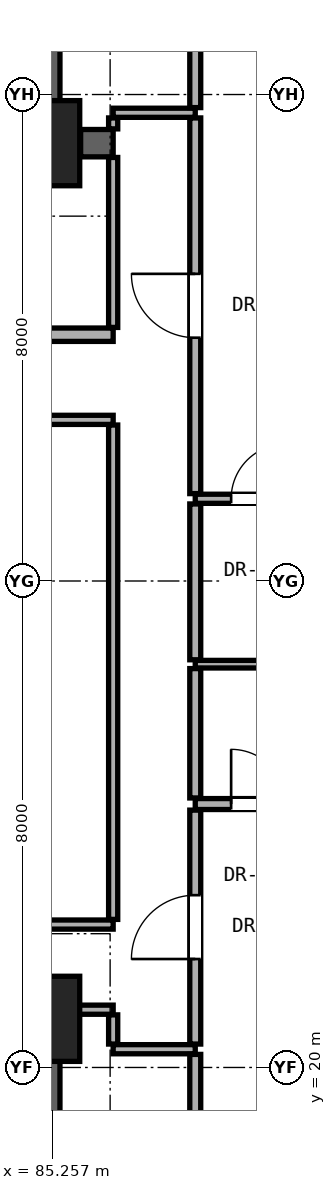
"""IFC4 building model, lengths in metres.
Left out: names, types, materials, properties, quantities, classifications, styles, units other than length and angle.
Written with IfcOpenShell. Run it as: python <this file> out.ifc"""

import sys

from ifc_helpers import new_model, si_unit, direction, frame, frame_2d, origin, origin_2d, place, context, subcontext, project, spatial, rectangle, extrude, element, fill, save


model = new_model("IFC4")
c1 = context("Model", 3, precision=1e-05, world=origin(), true_north=direction((0.0, 1.0)))
c2 = subcontext(c1, "Body", "Model", "MODEL_VIEW")
j1 = project(units=[si_unit("LENGTHUNIT", "METRE"), si_unit("PLANEANGLEUNIT", "RADIAN")], contexts=[c1])
p1 = place(None, origin())
s1 = spatial("IfcSite", under=j1, at=p1, CompositionType="ELEMENT")
p2 = place(p1, origin())
s2 = spatial("IfcBuilding", under=s1, at=p2, CompositionType="ELEMENT")
p3 = place(p2, frame((0.0, 0.0, 29.0)))
s3 = spatial("IfcBuildingStorey", under=s2, at=p3, CompositionType="ELEMENT", Elevation=29.0)
for number, where, z_axis, x_axis in (
    (1, (85.0, 20.8, 0.0), (0.0, 0.0, 1.0), (1.0, 0.0, 0.0)),
    (2, (85.0, 35.2, 0.0), (0.0, 0.0, 1.0), (1.0, 0.0, 0.0)),
):
    element("IfcColumn", number, at=place(p3, frame(where, z_axis=z_axis, x_axis=x_axis)), inside=s3, PredefinedType="COLUMN", context=c2, shape_type="SweptSolid", body=[
        extrude(rectangle(XDim=1.4, YDim=1.4, at=origin_2d()), origin(), (0.0, 0.0, 1.0), 3.3),
    ])
for number, where, z_axis, x_axis in (
    (3, (85.0, 35.2, 0.0), (0.0, 0.0, 1.0), (0.0, 1.0, 0.0)),
    (4, (85.0, 15.2, 0.0), (0.0, 0.0, 1.0), (0.0, 1.0, 0.0)),
):
    element("IfcWall", number, at=place(p3, frame(where, z_axis=z_axis, x_axis=x_axis)), inside=s3, PredefinedType="SHEAR", context=c2, shape_type="SweptSolid", body=[
        extrude(rectangle(XDim=5.6, YDim=0.75, at=frame_2d((2.8, 0.0))), origin(), (0.0, 0.0, 1.0), 3.06),
    ])
p4 = place(p3, frame((86.25, 20.3, 0.0), z_axis=(0.0, 0.0, 1.0), x_axis=(1.0, 0.0, 0.0)))
e5 = element("IfcWall", 5, at=p4, inside=s3, PredefinedType="PARTITIONING", context=c2, shape_type="SweptSolid", body=[
    extrude(rectangle(XDim=1.35, YDim=0.15, at=frame_2d((0.675, 0.0))), origin(), (0.0, 0.0, 1.0), 3.06),
])
p5 = place(p3, frame((85.37, 20.95, 0.0), z_axis=(0.0, 0.0, 1.0), x_axis=(1.0, 0.0, 0.0)))
e6 = element("IfcWall", 6, at=p5, inside=s3, PredefinedType="PARTITIONING", context=c2, shape_type="SweptSolid", body=[
    extrude(rectangle(XDim=0.88, YDim=0.15, at=frame_2d((0.44, 0.0))), origin(), (0.0, 0.0, 1.0), 2.452),
])
p6 = place(p3, frame((66.62, 22.35, 0.0), z_axis=(0.0, 0.0, 1.0), x_axis=(1.0, 0.0, 0.0)))
e7 = element("IfcWall", 7, at=p6, inside=s3, PredefinedType="PARTITIONING", context=c2, shape_type="SweptSolid", body=[
    extrude(rectangle(XDim=19.63, YDim=0.15, at=frame_2d((9.815, 0.0))), origin(), (0.0, 0.0, 1.0), 2.125),
])
p7 = place(p6, frame((8.129, 0.0, 0.0)))
e8 = element("IfcOpeningElement", 8, at=p7, cuts=e7, PredefinedType="OPENING", context=c2, shape_type="SweptSolid", body=[
    extrude(rectangle(XDim=0.85, YDim=2.01, at=frame_2d((0.425, 1.005))), frame((0.0, 0.085, 0.0), z_axis=(0.0, -1.0, 0.0), x_axis=(1.0, 0.0, 0.0)), (0.0, 0.0, 1.0), 0.17),
])
p8 = place(p3, frame((87.6, 24.332, 0.0), z_axis=(0.0, 0.0, 1.0), x_axis=(1.0, 0.0, 0.0)))
e9 = element("IfcWall", 9, at=p8, inside=s3, PredefinedType="PARTITIONING", context=c2, shape_type="SweptSolid", body=[
    extrude(rectangle(XDim=7.156, YDim=0.18, at=frame_2d((3.578, 0.0))), origin(), (0.0, 0.0, 1.0), 2.196),
])
p9 = place(p8, frame((4.103, 0.0, 0.0)))
e10 = element("IfcOpeningElement", 10, at=p9, cuts=e9, PredefinedType="OPENING", context=c2, shape_type="SweptSolid", body=[
    extrude(rectangle(XDim=0.95, YDim=2.15, at=frame_2d((0.475, 1.075))), frame((0.0, 0.1, 0.0), z_axis=(0.0, -1.0, 0.0), x_axis=(1.0, 0.0, 0.0)), (0.0, 0.0, 1.0), 0.2),
])
p10 = place(p8, frame((0.59, 0.0, 0.0)))
e11 = element("IfcOpeningElement", 11, at=p10, cuts=e9, PredefinedType="OPENING", context=c2, shape_type="SweptSolid", body=[
    extrude(rectangle(XDim=0.9, YDim=2.1, at=frame_2d((0.45, 1.05))), frame((0.0, 0.1, 0.0), z_axis=(0.0, -1.0, 0.0), x_axis=(1.0, 0.0, 0.0)), (0.0, 0.0, 1.0), 0.2),
])
p11 = place(p3, frame((87.6, 26.632, 0.0), z_axis=(0.0, 0.0, 1.0), x_axis=(1.0, 0.0, 0.0)))
e12 = element("IfcWall", 12, at=p11, inside=s3, PredefinedType="PARTITIONING", context=c2, shape_type="SweptSolid", body=[
    extrude(rectangle(XDim=7.156, YDim=0.125, at=frame_2d((3.578, 0.0))), origin(), (0.0, 0.0, 1.0), 2.196),
])
p12 = place(p3, frame((87.6, 29.352, 0.0), z_axis=(0.0, 0.0, 1.0), x_axis=(1.0, 0.0, 0.0)))
e13 = element("IfcWall", 13, at=p12, inside=s3, PredefinedType="PARTITIONING", context=c2, shape_type="SweptSolid", body=[
    extrude(rectangle(XDim=7.156, YDim=0.15, at=frame_2d((3.578, 0.0))), origin(), (0.0, 0.0, 1.0), 2.196),
])
p13 = place(p12, frame((4.103, 0.0, 0.0)))
e14 = element("IfcOpeningElement", 14, at=p13, cuts=e13, PredefinedType="OPENING", context=c2, shape_type="SweptSolid", body=[
    extrude(rectangle(XDim=0.95, YDim=2.15, at=frame_2d((0.475, 1.075))), frame((0.0, 0.085, 0.0), z_axis=(0.0, -1.0, 0.0), x_axis=(1.0, 0.0, 0.0)), (0.0, 0.0, 1.0), 0.17),
])
p14 = place(p12, frame((0.59, 0.0, 0.0)))
e15 = element("IfcOpeningElement", 15, at=p14, cuts=e13, PredefinedType="OPENING", context=c2, shape_type="SweptSolid", body=[
    extrude(rectangle(XDim=0.9, YDim=2.1, at=frame_2d((0.45, 1.05))), frame((0.0, 0.085, 0.0), z_axis=(0.0, -1.0, 0.0), x_axis=(1.0, 0.0, 0.0)), (0.0, 0.0, 1.0), 0.17),
])
p15 = place(p3, frame((66.62, 30.65, 0.0), z_axis=(0.0, 0.0, 1.0), x_axis=(1.0, 0.0, 0.0)))
e16 = element("IfcWall", 16, at=p15, inside=s3, PredefinedType="PARTITIONING", context=c2, shape_type="SweptSolid", body=[
    extrude(rectangle(XDim=19.63, YDim=0.15, at=frame_2d((9.815, 0.0))), origin(), (0.0, 0.0, 1.0), 2.125),
])
p16 = place(p15, frame((3.855, 0.0, 0.0)))
e17 = element("IfcOpeningElement", 17, at=p16, cuts=e16, PredefinedType="OPENING", context=c2, shape_type="SweptSolid", body=[
    extrude(rectangle(XDim=0.85, YDim=2.01, at=frame_2d((0.425, 1.005))), frame((0.0, 0.085, 0.0), z_axis=(0.0, -1.0, 0.0), x_axis=(1.0, 0.0, 0.0)), (0.0, 0.0, 1.0), 0.17),
])
p17 = place(p15, frame((15.209, 0.0, 0.0)))
e18 = element("IfcOpeningElement", 18, at=p17, cuts=e16, PredefinedType="OPENING", context=c2, shape_type="SweptSolid", body=[
    extrude(rectangle(XDim=0.85, YDim=2.01, at=frame_2d((0.425, 1.005))), frame((0.0, 0.085, 0.0), z_axis=(0.0, -1.0, 0.0), x_axis=(1.0, 0.0, 0.0)), (0.0, 0.0, 1.0), 0.17),
])
p18 = place(p3, frame((71.55, 32.05, 0.0), z_axis=(0.0, 0.0, 1.0), x_axis=(1.0, 0.0, 0.0)))
e19 = element("IfcWall", 19, at=p18, inside=s3, PredefinedType="SOLIDWALL", context=c2, shape_type="SweptSolid", body=[
    extrude(rectangle(XDim=14.7, YDim=0.22, at=frame_2d((7.35, 0.0))), origin(), (0.0, 0.0, 1.0), 2.125),
])
p19 = place(p18, frame((11.39, 0.0, 0.0)))
e20 = element("IfcOpeningElement", 20, at=p19, cuts=e19, PredefinedType="OPENING", context=c2, shape_type="SweptSolid", body=[
    extrude(rectangle(XDim=0.85, YDim=2.01, at=frame_2d((0.425, 1.005))), frame((0.0, 0.12, 0.0), z_axis=(0.0, -1.0, 0.0), x_axis=(1.0, 0.0, 0.0)), (0.0, 0.0, 1.0), 0.24),
])
p20 = place(p18, frame((6.065, 0.0, 0.0)))
e21 = element("IfcOpeningElement", 21, at=p20, cuts=e19, PredefinedType="OPENING", context=c2, shape_type="SweptSolid", body=[
    extrude(rectangle(XDim=0.85, YDim=2.01, at=frame_2d((0.425, 1.005))), frame((0.0, 0.12, 0.0), z_axis=(0.0, -1.0, 0.0), x_axis=(1.0, 0.0, 0.0)), (0.0, 0.0, 1.0), 0.24),
])
p21 = place(p18, frame((1.65, 0.0, 0.0)))
e22 = element("IfcOpeningElement", 22, at=p21, cuts=e19, PredefinedType="OPENING", context=c2, shape_type="SweptSolid", body=[
    extrude(rectangle(XDim=0.85, YDim=2.01, at=frame_2d((0.425, 1.005))), frame((0.0, 0.12, 0.0), z_axis=(0.0, -1.0, 0.0), x_axis=(1.0, 0.0, 0.0)), (0.0, 0.0, 1.0), 0.24),
])
p22 = place(p3, frame((85.715, 35.2, 0.0), z_axis=(0.0, 0.0, 1.0), x_axis=(1.0, 0.0, 0.0)))
e23 = element("IfcWall", 23, at=p22, inside=s3, PredefinedType="SHEAR", context=c2, shape_type="SweptSolid", body=[
    extrude(rectangle(XDim=0.535, YDim=0.45, at=frame_2d((0.268, 0.0))), origin(), (0.0, 0.0, 1.0), 3.06),
])
p23 = place(p3, frame((86.25, 35.7, 0.0), z_axis=(0.0, 0.0, 1.0), x_axis=(1.0, 0.0, 0.0)))
e24 = element("IfcWall", 24, at=p23, inside=s3, PredefinedType="PARTITIONING", context=c2, shape_type="SweptSolid", body=[
    extrude(rectangle(XDim=1.35, YDim=0.15, at=frame_2d((0.675, 0.0))), origin(), (0.0, 0.0, 1.0), 3.06),
])
p24 = place(p3, frame((86.25, 20.385, 0.0), z_axis=(0.0, 0.0, 1.0), x_axis=(0.0, 1.0, 0.0)))
e25 = element("IfcWall", 25, at=p24, inside=s3, PredefinedType="PARTITIONING", context=c2, shape_type="SweptSolid", body=[
    extrude(rectangle(XDim=0.48, YDim=0.15, at=frame_2d((0.24, 0.0))), origin(), (0.0, 0.0, 1.0), 2.452),
])
p25 = place(p3, frame((86.25, 22.435, 0.0), z_axis=(0.0, 0.0, 1.0), x_axis=(0.0, 1.0, 0.0)))
e26 = element("IfcWall", 26, at=p25, inside=s3, PredefinedType="PARTITIONING", context=c2, shape_type="SweptSolid", body=[
    extrude(rectangle(XDim=8.13, YDim=0.15, at=frame_2d((4.065, 0.0))), origin(), (0.0, 0.0, 1.0), 2.279),
])
p26 = place(p3, frame((86.25, 32.17, 0.0), z_axis=(0.0, 0.0, 1.0), x_axis=(0.0, 1.0, 0.0)))
e27 = element("IfcWall", 27, at=p26, inside=s3, PredefinedType="PARTITIONING", context=c2, shape_type="SweptSolid", body=[
    extrude(rectangle(XDim=2.795, YDim=0.15, at=frame_2d((1.397, 0.0))), origin(), (0.0, 0.0, 1.0), 2.452),
])
p27 = place(p3, frame((86.25, 35.435, 0.0), z_axis=(0.0, 0.0, 1.0), x_axis=(0.0, 1.0, 0.0)))
e28 = element("IfcWall", 28, at=p27, inside=s3, PredefinedType="PARTITIONING", context=c2, shape_type="SweptSolid", body=[
    extrude(rectangle(XDim=0.18, YDim=0.15, at=frame_2d((0.09, 0.0))), origin(), (0.0, 0.0, 1.0), 2.452),
])
p28 = place(p3, frame((87.6, 16.533, 0.0), z_axis=(0.0, 0.0, 1.0), x_axis=(0.0, 1.0, 0.0)))
e29 = element("IfcWall", 29, at=p28, inside=s3, PredefinedType="PARTITIONING", context=c2, shape_type="SweptSolid", body=[
    extrude(rectangle(XDim=3.682, YDim=0.18, at=frame_2d((1.841, 0.0))), origin(), (0.0, 0.0, 1.0), 2.436),
])
p29 = place(p3, frame((87.6, 20.385, 0.0), z_axis=(0.0, 0.0, 1.0), x_axis=(0.0, 1.0, 0.0)))
e30 = element("IfcWall", 30, at=p29, inside=s3, PredefinedType="PARTITIONING", context=c2, shape_type="SweptSolid", body=[
    extrude(rectangle(XDim=3.847, YDim=0.18, at=frame_2d((1.923, 0.0))), origin(), (0.0, 0.0, 1.0), 2.452),
])
p30 = place(p29, frame((1.398, 0.0, 0.0)))
e31 = element("IfcOpeningElement", 31, at=p30, cuts=e30, PredefinedType="OPENING", context=c2, shape_type="SweptSolid", body=[
    extrude(rectangle(XDim=1.05, YDim=2.2, at=frame_2d((0.525, 1.1))), frame((0.0, 0.1, 0.0), z_axis=(0.0, -1.0, 0.0), x_axis=(1.0, 0.0, 0.0)), (0.0, 0.0, 1.0), 0.2),
])
p31 = place(p3, frame((87.6, 24.432, 0.0), z_axis=(0.0, 0.0, 1.0), x_axis=(0.0, 1.0, 0.0)))
e32 = element("IfcWall", 32, at=p31, inside=s3, PredefinedType="PARTITIONING", context=c2, shape_type="SweptSolid", body=[
    extrude(rectangle(XDim=2.128, YDim=0.18, at=frame_2d((1.064, 0.0))), origin(), (0.0, 0.0, 1.0), 3.06),
])
p32 = place(p3, frame((87.6, 26.705, 0.0), z_axis=(0.0, 0.0, 1.0), x_axis=(0.0, 1.0, 0.0)))
e33 = element("IfcWall", 33, at=p32, inside=s3, PredefinedType="PARTITIONING", context=c2, shape_type="SweptSolid", body=[
    extrude(rectangle(XDim=2.562, YDim=0.18, at=frame_2d((1.281, 0.0))), origin(), (0.0, 0.0, 1.0), 2.279),
])
p33 = place(p3, frame((87.6, 29.437, 0.0), z_axis=(0.0, 0.0, 1.0), x_axis=(0.0, 1.0, 0.0)))
e34 = element("IfcWall", 34, at=p33, inside=s3, PredefinedType="PARTITIONING", context=c2, shape_type="SweptSolid", body=[
    extrude(rectangle(XDim=6.178, YDim=0.18, at=frame_2d((3.089, 0.0))), origin(), (0.0, 0.0, 1.0), 2.452),
])
p34 = place(p33, frame((2.564, 0.0, 0.0)))
e35 = element("IfcOpeningElement", 35, at=p34, cuts=e34, PredefinedType="OPENING", context=c2, shape_type="SweptSolid", body=[
    extrude(rectangle(XDim=1.05, YDim=2.2, at=frame_2d((0.525, 1.1))), frame((0.0, 0.1, 0.0), z_axis=(0.0, -1.0, 0.0), x_axis=(1.0, 0.0, 0.0)), (0.0, 0.0, 1.0), 0.2),
])
p35 = place(p3, frame((87.6, 35.785, 0.0), z_axis=(0.0, 0.0, 1.0), x_axis=(0.0, 1.0, 0.0)))
e36 = element("IfcWall", 36, at=p35, inside=s3, PredefinedType="PARTITIONING", context=c2, shape_type="SweptSolid", body=[
    extrude(rectangle(XDim=3.697, YDim=0.18, at=frame_2d((1.849, 0.0))), origin(), (0.0, 0.0, 1.0), 2.436),
])
p36 = place(p30, origin())
e37 = element("IfcDoor", 37, at=p36, inside=s3, OperationType="SINGLE_SWING_LEFT", PredefinedType="DOOR", context=c2, shape_type="SweptSolid", body=[
    extrude(rectangle(XDim=1.05, YDim=2.2, at=frame_2d((0.525, 1.1))), frame((0.0, 0.025, 0.0), z_axis=(0.0, -1.0, 0.0), x_axis=(1.0, 0.0, 0.0)), (0.0, 0.0, 1.0), 0.05),
])
fill(e31, e37)
p37 = place(p10, origin())
e38 = element("IfcDoor", 38, at=p37, inside=s3, OperationType="SINGLE_SWING_LEFT", PredefinedType="DOOR", context=c2, shape_type="SweptSolid", body=[
    extrude(rectangle(XDim=0.9, YDim=2.1, at=frame_2d((0.45, 1.05))), frame((0.0, 0.025, 0.0), z_axis=(0.0, -1.0, 0.0), x_axis=(1.0, 0.0, 0.0)), (0.0, 0.0, 1.0), 0.05),
])
fill(e11, e38)
p38 = place(p34, origin())
e39 = element("IfcDoor", 39, at=p38, inside=s3, OperationType="SINGLE_SWING_RIGHT", PredefinedType="DOOR", context=c2, shape_type="SweptSolid", body=[
    extrude(rectangle(XDim=1.05, YDim=2.2, at=frame_2d((0.525, 1.1))), frame((0.0, 0.025, 0.0), z_axis=(0.0, -1.0, 0.0), x_axis=(1.0, 0.0, 0.0)), (0.0, 0.0, 1.0), 0.05),
])
fill(e35, e39)
p39 = place(p14, origin())
e40 = element("IfcDoor", 40, at=p39, inside=s3, OperationType="SINGLE_SWING_RIGHT", PredefinedType="DOOR", context=c2, shape_type="SweptSolid", body=[
    extrude(rectangle(XDim=0.9, YDim=2.1, at=frame_2d((0.45, 1.05))), frame((0.0, 0.025, 0.0), z_axis=(0.0, -1.0, 0.0), x_axis=(1.0, 0.0, 0.0)), (0.0, 0.0, 1.0), 0.05),
])
fill(e15, e40)
save(model, sys.argv[1])
